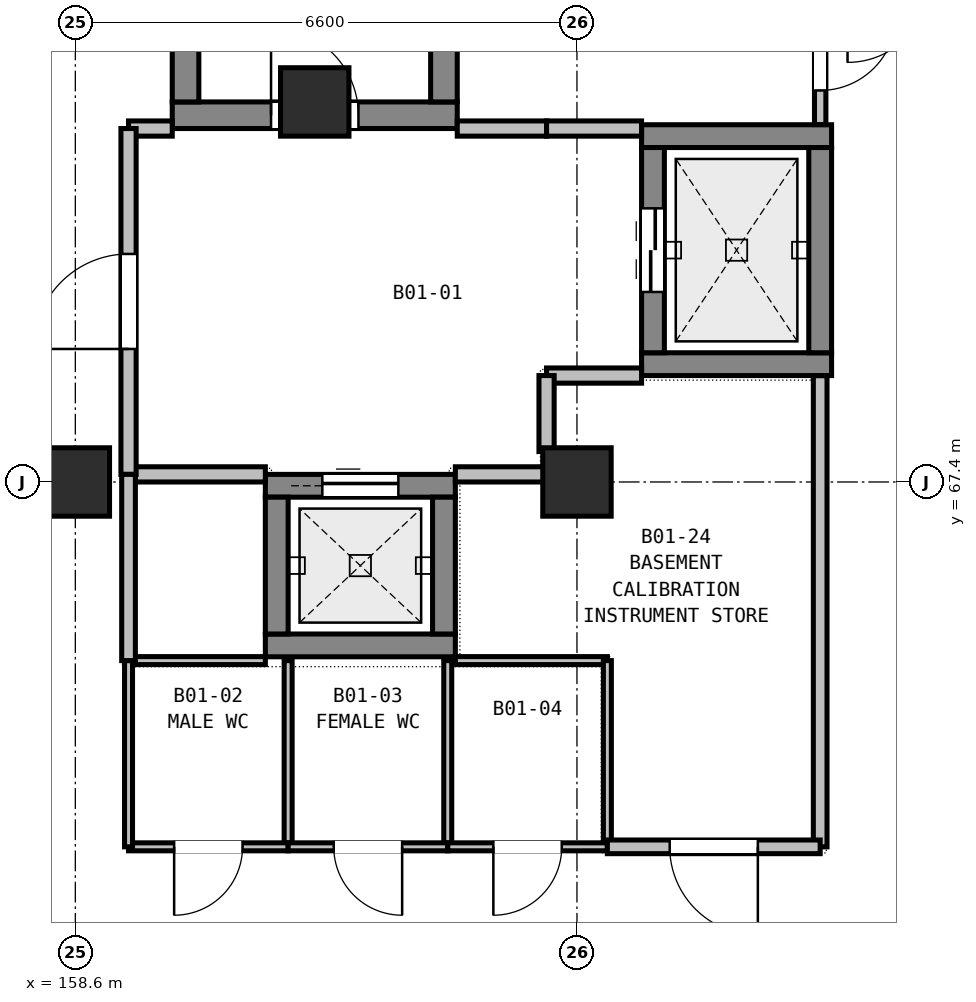
"""IFC4 building model, lengths in metres.
Left out: names, types, materials, properties, quantities, classifications, styles, units other than length and angle.
Written with IfcOpenShell. Run it as: python <this file> out.ifc"""

import sys

from ifc_helpers import new_model, si_unit, direction, frame, frame_2d, origin, origin_2d, place, context, subcontext, project, spatial, rectangle, extrude, element, fill, save


model = new_model("IFC4")
c1 = context("Model", 3, precision=1e-05, world=origin(), true_north=direction((0.0, 1.0)))
c2 = subcontext(c1, "Body", "Model", "MODEL_VIEW")
j1 = project(units=[si_unit("LENGTHUNIT", "METRE"), si_unit("PLANEANGLEUNIT", "RADIAN")], contexts=[c1])
p1 = place(None, origin())
s1 = spatial("IfcSite", under=j1, at=p1, CompositionType="ELEMENT")
p2 = place(p1, origin())
s2 = spatial("IfcBuilding", under=s1, at=p2, CompositionType="ELEMENT")
p3 = place(p2, frame((0.0, 0.0, -4.5)))
s3 = spatial("IfcBuildingStorey", under=s2, at=p3, CompositionType="ELEMENT", Elevation=-4.5)
for number, where, z_axis, x_axis in (
    (1, (158.6, 67.4, 0.0), (0.0, 0.0, 1.0), (1.0, 0.0, 0.0)),
    (2, (165.2, 67.4, 0.0), (0.0, 0.0, 1.0), (1.0, 0.0, 0.0)),
):
    element("IfcColumn", number, at=place(p3, frame(where, z_axis=z_axis, x_axis=x_axis)), inside=s3, PredefinedType="COLUMN", context=c2, shape_type="SweptSolid", body=[
        extrude(rectangle(XDim=0.8, YDim=0.8, at=origin_2d()), origin(), (0.0, 0.0, 1.0), 4.5),
    ])
p4 = place(p3, frame((159.875, 72.225, 0.0), z_axis=(0.0, 0.0, 1.0), x_axis=(1.0, 0.0, 0.0)))
e3 = element("IfcWall", 3, at=p4, inside=s3, PredefinedType="SHEAR", context=c2, shape_type="SweptSolid", body=[
    extrude(rectangle(XDim=3.75, YDim=0.35, at=frame_2d((1.875, 0.0))), origin(), (0.0, 0.0, 1.0), 4.5),
])
p5 = place(p4, frame((1.3, 0.0, 0.0)))
e4 = element("IfcOpeningElement", 4, at=p5, cuts=e3, PredefinedType="OPENING", context=c2, shape_type="SweptSolid", body=[
    extrude(rectangle(XDim=1.15, YDim=2.15, at=frame_2d((0.575, 1.075))), frame((0.0, 0.185, 0.0), z_axis=(0.0, -1.0, 0.0), x_axis=(1.0, 0.0, 0.0)), (0.0, 0.0, 1.0), 0.37),
])
for number, where, z_axis, x_axis in (
    (5, (160.05, 72.4, 0.0), (0.0, 0.0, 1.0), (0.0, 1.0, 0.0)),
    (6, (163.45, 72.4, 0.0), (0.0, 0.0, 1.0), (0.0, 1.0, 0.0)),
):
    element("IfcWall", number, at=place(p3, frame(where, z_axis=z_axis, x_axis=x_axis)), inside=s3, PredefinedType="SHEAR", context=c2, shape_type="SweptSolid", body=[
        extrude(rectangle(XDim=7.375, YDim=0.35, at=frame_2d((3.688, 0.0))), origin(), (0.0, 0.0, 1.0), 4.5),
    ])
for number, where, z_axis, x_axis in (
    (7, (166.05, 68.95, -0.82), (0.0, 0.0, 1.0), (1.0, 0.0, 0.0)),
    (8, (166.05, 71.95, -0.82), (0.0, 0.0, 1.0), (1.0, 0.0, 0.0)),
):
    element("IfcWall", number, at=place(p3, frame(where, z_axis=z_axis, x_axis=x_axis)), inside=s3, PredefinedType="SHEAR", context=c2, shape_type="SweptSolid", body=[
        extrude(rectangle(XDim=2.5, YDim=0.3, at=frame_2d((1.25, 0.0))), origin(), (0.0, 0.0, 1.0), 5.32),
    ])
p6 = place(p3, frame((166.2, 69.1, -0.82), z_axis=(0.0, 0.0, 1.0), x_axis=(0.0, 1.0, 0.0)))
e9 = element("IfcWall", 9, at=p6, inside=s3, PredefinedType="SHEAR", context=c2, shape_type="SweptSolid", body=[
    extrude(rectangle(XDim=2.7, YDim=0.3, at=frame_2d((1.35, 0.0))), origin(), (0.0, 0.0, 1.0), 5.32),
])
p7 = place(p6, frame((0.8, 0.0, 0.82)))
e10 = element("IfcOpeningElement", 10, at=p7, cuts=e9, PredefinedType="OPENING", context=c2, shape_type="SweptSolid", body=[
    extrude(rectangle(XDim=1.1, YDim=2.1, at=frame_2d((0.55, 1.05))), frame((0.0, 0.16, 0.0), z_axis=(0.0, -1.0, 0.0), x_axis=(1.0, 0.0, 0.0)), (0.0, 0.0, 1.0), 0.32),
])
p8 = place(p3, frame((168.4, 69.1, -0.82), z_axis=(0.0, 0.0, 1.0), x_axis=(0.0, 1.0, 0.0)))
e11 = element("IfcWall", 11, at=p8, inside=s3, PredefinedType="SHEAR", context=c2, shape_type="SweptSolid", body=[
    extrude(rectangle(XDim=2.7, YDim=0.3, at=frame_2d((1.35, 0.0))), origin(), (0.0, 0.0, 1.0), 5.32),
])
p9 = place(p3, frame((161.1, 65.25, -0.82), z_axis=(0.0, 0.0, 1.0), x_axis=(1.0, 0.0, 0.0)))
e12 = element("IfcWall", 12, at=p9, inside=s3, PredefinedType="SHEAR", context=c2, shape_type="SweptSolid", body=[
    extrude(rectangle(XDim=2.5, YDim=0.3, at=frame_2d((1.25, 0.0))), origin(), (0.0, 0.0, 1.0), 5.32),
])
p10 = place(p3, frame((161.1, 67.35, -0.82), z_axis=(0.0, 0.0, 1.0), x_axis=(1.0, 0.0, 0.0)))
e13 = element("IfcWall", 13, at=p10, inside=s3, PredefinedType="SHEAR", context=c2, shape_type="SweptSolid", body=[
    extrude(rectangle(XDim=2.5, YDim=0.3, at=frame_2d((1.25, 0.0))), origin(), (0.0, 0.0, 1.0), 5.32),
])
p11 = place(p10, frame((0.75, 0.0, 0.82)))
e14 = element("IfcOpeningElement", 14, at=p11, cuts=e13, PredefinedType="OPENING", context=c2, shape_type="SweptSolid", body=[
    extrude(rectangle(XDim=1.0, YDim=2.1, at=frame_2d((0.5, 1.05))), frame((0.0, 0.16, 0.0), z_axis=(0.0, -1.0, 0.0), x_axis=(1.0, 0.0, 0.0)), (0.0, 0.0, 1.0), 0.32),
])
for number, where, z_axis, x_axis in (
    (15, (161.25, 65.4, -0.82), (0.0, 0.0, 1.0), (0.0, 1.0, 0.0)),
    (16, (163.45, 65.4, -0.82), (0.0, 0.0, 1.0), (0.0, 1.0, 0.0)),
):
    element("IfcWall", number, at=place(p3, frame(where, z_axis=z_axis, x_axis=x_axis)), inside=s3, PredefinedType="SHEAR", context=c2, shape_type="SweptSolid", body=[
        extrude(rectangle(XDim=1.8, YDim=0.3, at=frame_2d((0.9, 0.0))), origin(), (0.0, 0.0, 1.0), 5.32),
    ])
for number, where, z_axis, x_axis in (
    (17, (158.6, 67.4, -1.2), (0.0, 0.0, 1.0), (1.0, 0.0, 0.0)),
    (18, (161.75, 72.4, -1.2), (0.0, 0.0, 1.0), (1.0, 0.0, 0.0)),
    (19, (165.2, 67.4, -1.2), (0.0, 0.0, 1.0), (1.0, 0.0, 0.0)),
):
    element("IfcColumn", number, at=place(p3, frame(where, z_axis=z_axis, x_axis=x_axis)), inside=s3, PredefinedType="COLUMN", context=c2, shape_type="SweptSolid", body=[
        extrude(rectangle(XDim=0.9, YDim=0.9, at=origin_2d()), origin(), (0.0, 0.0, 1.0), 1.2),
    ])
p12 = place(p3, frame((159.3, 72.05, 0.0), z_axis=(0.0, 0.0, 1.0), x_axis=(1.0, 0.0, 0.0)))
e20 = element("IfcWall", 20, at=p12, inside=s3, PredefinedType="PARTITIONING", context=c2, shape_type="SweptSolid", body=[
    extrude(rectangle(XDim=0.575, YDim=0.2, at=frame_2d((0.288, 0.0))), origin(), (0.0, 0.0, 1.0), 4.175),
])
p13 = place(p3, frame((163.625, 72.05, 0.0), z_axis=(0.0, 0.0, 1.0), x_axis=(1.0, 0.0, 0.0)))
e21 = element("IfcWall", 21, at=p13, inside=s3, PredefinedType="PARTITIONING", context=c2, shape_type="SweptSolid", body=[
    extrude(rectangle(XDim=1.175, YDim=0.2, at=frame_2d((0.587, 0.0))), origin(), (0.0, 0.0, 1.0), 4.175),
])
for number, where, z_axis, x_axis in (
    (22, (164.8, 72.05, 0.0), (0.0, 0.0, 1.0), (1.0, 0.0, 0.0)),
    (23, (166.05, 68.8, 0.0), (0.0, 0.0, 1.0), (-1.0, 0.0, 0.0)),
):
    element("IfcWall", number, at=place(p3, frame(where, z_axis=z_axis, x_axis=x_axis)), inside=s3, PredefinedType="PARTITIONING", context=c2, shape_type="SweptSolid", body=[
        extrude(rectangle(XDim=1.25, YDim=0.2, at=frame_2d((0.625, 0.0))), origin(), (0.0, 0.0, 1.0), 3.635),
    ])
p14 = place(p3, frame((164.8, 68.8, 0.0), z_axis=(0.0, 0.0, 1.0), x_axis=(0.0, -1.0, 0.0)))
e24 = element("IfcWall", 24, at=p14, inside=s3, PredefinedType="PARTITIONING", context=c2, shape_type="SweptSolid", body=[
    extrude(rectangle(XDim=1.0, YDim=0.2, at=frame_2d((0.5, 0.0))), origin(), (0.0, 0.0, 1.0), 4.175),
])
p15 = place(p3, frame((164.8, 67.5, 0.0), z_axis=(0.0, 0.0, 1.0), x_axis=(-1.0, 0.0, 0.0)))
e25 = element("IfcWall", 25, at=p15, inside=s3, PredefinedType="PARTITIONING", context=c2, shape_type="SweptSolid", body=[
    extrude(rectangle(XDim=1.2, YDim=0.2, at=frame_2d((0.6, 0.0))), origin(), (0.0, 0.0, 1.0), 3.835),
])
p16 = place(p3, frame((161.1, 67.5, 0.0), z_axis=(0.0, 0.0, 1.0), x_axis=(-1.0, 0.0, 0.0)))
e26 = element("IfcWall", 26, at=p16, inside=s3, PredefinedType="PARTITIONING", context=c2, shape_type="SweptSolid", body=[
    extrude(rectangle(XDim=1.8, YDim=0.2, at=frame_2d((0.9, 0.0))), origin(), (0.0, 0.0, 1.0), 3.835),
])
p17 = place(p3, frame((159.3, 67.5, 0.0), z_axis=(0.0, 0.0, 1.0), x_axis=(0.0, 1.0, 0.0)))
e27 = element("IfcWall", 27, at=p17, inside=s3, PredefinedType="PARTITIONING", context=c2, shape_type="SweptSolid", body=[
    extrude(rectangle(XDim=4.55, YDim=0.2, at=frame_2d((2.275, 0.0))), origin(), (0.0, 0.0, 1.0), 3.835),
])
p18 = place(p17, frame((1.65, 0.0, 0.0)))
e28 = element("IfcOpeningElement", 28, at=p18, cuts=e27, PredefinedType="OPENING", context=c2, shape_type="SweptSolid", body=[
    extrude(rectangle(XDim=1.25, YDim=2.15, at=frame_2d((0.625, 1.075))), frame((0.0, 0.11, 0.0), z_axis=(0.0, -1.0, 0.0), x_axis=(1.0, 0.0, 0.0)), (0.0, 0.0, 1.0), 0.22),
])
p19 = place(p3, frame((168.4, 74.0, 0.0), z_axis=(0.0, 0.0, 1.0), x_axis=(0.0, -1.0, 0.0)))
e29 = element("IfcWall", 29, at=p19, inside=s3, PredefinedType="PARTITIONING", context=c2, shape_type="SweptSolid", body=[
    extrude(rectangle(XDim=1.898, YDim=0.15, at=frame_2d((0.949, 0.0))), origin(), (0.0, 0.0, 1.0), 4.035),
])
p20 = place(p19, frame((0.449, 0.0, 0.0)))
e30 = element("IfcOpeningElement", 30, at=p20, cuts=e29, PredefinedType="OPENING", context=c2, shape_type="SweptSolid", body=[
    extrude(rectangle(XDim=1.0, YDim=2.1, at=frame_2d((0.5, 1.05))), frame((0.0, 0.085, 0.0), z_axis=(0.0, -1.0, 0.0), x_axis=(1.0, 0.0, 0.0)), (0.0, 0.0, 1.0), 0.17),
])
p21 = place(p3, frame((159.3, 65.05, 0.0), z_axis=(0.0, 0.0, 1.0), x_axis=(1.0, 0.0, 0.0)))
e31 = element("IfcWall", 31, at=p21, inside=s3, PredefinedType="PARTITIONING", context=c2, shape_type="SweptSolid", body=[
    extrude(rectangle(XDim=1.8, YDim=0.105, at=frame_2d((0.9, 0.0))), origin(), (0.0, 0.0, 1.0), 4.175),
])
p22 = place(p3, frame((161.4, 65.05, 0.0), z_axis=(0.0, 0.0, 1.0), x_axis=(0.0, -1.0, 0.0)))
e32 = element("IfcWall", 32, at=p22, inside=s3, PredefinedType="PARTITIONING", context=c2, shape_type="SweptSolid", body=[
    extrude(rectangle(XDim=2.45, YDim=0.105, at=frame_2d((1.225, 0.0))), origin(), (0.0, 0.0, 1.0), 4.175),
])
p23 = place(p3, frame((161.4, 62.6, 0.0), z_axis=(0.0, 0.0, 1.0), x_axis=(-1.0, 0.0, 0.0)))
e33 = element("IfcWall", 33, at=p23, inside=s3, PredefinedType="PARTITIONING", context=c2, shape_type="SweptSolid", body=[
    extrude(rectangle(XDim=2.1, YDim=0.105, at=frame_2d((1.05, 0.0))), origin(), (0.0, 0.0, 1.0), 4.175),
])
p24 = place(p23, frame((0.6, 0.0, 0.0)))
e34 = element("IfcOpeningElement", 34, at=p24, cuts=e33, PredefinedType="OPENING", context=c2, shape_type="SweptSolid", body=[
    extrude(rectangle(XDim=0.9, YDim=2.02, at=frame_2d((0.45, 1.01))), frame((0.0, 0.062, 0.0), z_axis=(0.0, -1.0, 0.0), x_axis=(1.0, 0.0, 0.0)), (0.0, 0.0, 1.0), 0.125),
])
for number, where, z_axis, x_axis in (
    (35, (159.3, 62.6, 0.0), (0.0, 0.0, 1.0), (0.0, 1.0, 0.0)),
    (36, (163.5, 65.05, 0.0), (0.0, 0.0, 1.0), (0.0, -1.0, 0.0)),
):
    element("IfcWall", number, at=place(p3, frame(where, z_axis=z_axis, x_axis=x_axis)), inside=s3, PredefinedType="PARTITIONING", context=c2, shape_type="SweptSolid", body=[
        extrude(rectangle(XDim=2.45, YDim=0.105, at=frame_2d((1.225, 0.0))), origin(), (0.0, 0.0, 1.0), 4.175),
    ])
p25 = place(p3, frame((163.5, 62.6, 0.0), z_axis=(0.0, 0.0, 1.0), x_axis=(-1.0, 0.0, 0.0)))
e37 = element("IfcWall", 37, at=p25, inside=s3, PredefinedType="PARTITIONING", context=c2, shape_type="SweptSolid", body=[
    extrude(rectangle(XDim=2.1, YDim=0.105, at=frame_2d((1.05, 0.0))), origin(), (0.0, 0.0, 1.0), 4.175),
])
p26 = place(p25, frame((0.6, 0.0, 0.0)))
e38 = element("IfcOpeningElement", 38, at=p26, cuts=e37, PredefinedType="OPENING", context=c2, shape_type="SweptSolid", body=[
    extrude(rectangle(XDim=0.9, YDim=2.02, at=frame_2d((0.45, 1.01))), frame((0.0, 0.062, 0.0), z_axis=(0.0, -1.0, 0.0), x_axis=(1.0, 0.0, 0.0)), (0.0, 0.0, 1.0), 0.125),
])
p27 = place(p3, frame((163.6, 65.05, 0.0), z_axis=(0.0, 0.0, 1.0), x_axis=(1.0, 0.0, 0.0)))
e39 = element("IfcWall", 39, at=p27, inside=s3, PredefinedType="PARTITIONING", context=c2, shape_type="SweptSolid", body=[
    extrude(rectangle(XDim=2.0, YDim=0.105, at=frame_2d((1.0, 0.0))), origin(), (0.0, 0.0, 1.0), 3.635),
])
p28 = place(p3, frame((165.6, 65.05, 0.0), z_axis=(0.0, 0.0, 1.0), x_axis=(0.0, -1.0, 0.0)))
e40 = element("IfcWall", 40, at=p28, inside=s3, PredefinedType="PARTITIONING", context=c2, shape_type="SweptSolid", body=[
    extrude(rectangle(XDim=2.45, YDim=0.105, at=frame_2d((1.225, 0.0))), origin(), (0.0, 0.0, 1.0), 4.175),
])
p29 = place(p3, frame((165.6, 62.6, 0.0), z_axis=(0.0, 0.0, 1.0), x_axis=(-1.0, 0.0, 0.0)))
e41 = element("IfcWall", 41, at=p29, inside=s3, PredefinedType="PARTITIONING", context=c2, shape_type="SweptSolid", body=[
    extrude(rectangle(XDim=2.1, YDim=0.105, at=frame_2d((1.05, 0.0))), origin(), (0.0, 0.0, 1.0), 3.635),
])
p30 = place(p29, frame((0.6, 0.0, 0.0)))
e42 = element("IfcOpeningElement", 42, at=p30, cuts=e41, PredefinedType="OPENING", context=c2, shape_type="SweptSolid", body=[
    extrude(rectangle(XDim=0.9, YDim=2.02, at=frame_2d((0.45, 1.01))), frame((0.0, 0.062, 0.0), z_axis=(0.0, -1.0, 0.0), x_axis=(1.0, 0.0, 0.0)), (0.0, 0.0, 1.0), 0.125),
])
p31 = place(p3, frame((168.4, 68.798, 0.0), z_axis=(0.0, 0.0, 1.0), x_axis=(0.0, -1.0, 0.0)))
e43 = element("IfcWall", 43, at=p31, inside=s3, PredefinedType="PARTITIONING", context=c2, shape_type="SweptSolid", body=[
    extrude(rectangle(XDim=6.198, YDim=0.18, at=frame_2d((3.099, 0.0))), origin(), (0.0, 0.0, 1.0), 3.835),
])
p32 = place(p3, frame((168.4, 62.6, 0.0), z_axis=(0.0, 0.0, 1.0), x_axis=(-1.0, 0.0, 0.0)))
e44 = element("IfcWall", 44, at=p32, inside=s3, PredefinedType="PARTITIONING", context=c2, shape_type="SweptSolid", body=[
    extrude(rectangle(XDim=2.8, YDim=0.18, at=frame_2d((1.4, 0.0))), origin(), (0.0, 0.0, 1.0), 4.035),
])
p33 = place(p32, frame((0.82, 0.0, 0.0)))
e45 = element("IfcOpeningElement", 45, at=p33, cuts=e44, PredefinedType="OPENING", context=c2, shape_type="SweptSolid", body=[
    extrude(rectangle(XDim=1.16, YDim=2.14, at=frame_2d((0.58, 1.07))), frame((0.0, 0.1, 0.0), z_axis=(0.0, -1.0, 0.0), x_axis=(1.0, 0.0, 0.0)), (0.0, 0.0, 1.0), 0.2),
])
p34 = place(p3, frame((159.3, 65.05, 0.0), z_axis=(0.0, 0.0, 1.0), x_axis=(0.0, 1.0, 0.0)))
e46 = element("IfcWall", 46, at=p34, inside=s3, PredefinedType="PARTITIONING", context=c2, shape_type="SweptSolid", body=[
    extrude(rectangle(XDim=2.45, YDim=0.18, at=frame_2d((1.225, 0.0))), origin(), (0.0, 0.0, 1.0), 3.835),
])
p35 = place(p5, origin())
e47 = element("IfcDoor", 47, at=p35, inside=s3, OperationType="SINGLE_SWING_LEFT", PredefinedType="DOOR", context=c2, shape_type="SweptSolid", body=[
    extrude(rectangle(XDim=1.15, YDim=2.15, at=frame_2d((0.575, 1.075))), frame((0.0, 0.025, 0.0), z_axis=(0.0, -1.0, 0.0), x_axis=(1.0, 0.0, 0.0)), (0.0, 0.0, 1.0), 0.05),
])
fill(e4, e47)
p36 = place(p7, origin())
e48 = element("IfcDoor", 48, at=p36, inside=s3, OperationType="DOUBLE_DOOR_SLIDING", PredefinedType="DOOR", context=c2, shape_type="SweptSolid", body=[
    extrude(rectangle(XDim=1.1, YDim=2.1, at=frame_2d((0.55, 1.05))), frame((0.0, 0.025, 0.0), z_axis=(0.0, -1.0, 0.0), x_axis=(1.0, 0.0, 0.0)), (0.0, 0.0, 1.0), 0.05),
])
fill(e10, e48)
p37 = place(p11, origin())
e49 = element("IfcDoor", 49, at=p37, inside=s3, OperationType="SLIDING_TO_LEFT", PredefinedType="DOOR", context=c2, shape_type="SweptSolid", body=[
    extrude(rectangle(XDim=1.0, YDim=2.1, at=frame_2d((0.5, 1.05))), frame((0.0, 0.025, 0.0), z_axis=(0.0, -1.0, 0.0), x_axis=(1.0, 0.0, 0.0)), (0.0, 0.0, 1.0), 0.05),
])
fill(e14, e49)
p38 = place(p18, origin())
e50 = element("IfcDoor", 50, at=p38, inside=s3, OperationType="SINGLE_SWING_LEFT", PredefinedType="DOOR", context=c2, shape_type="SweptSolid", body=[
    extrude(rectangle(XDim=1.25, YDim=2.15, at=frame_2d((0.625, 1.075))), frame((0.0, 0.025, 0.0), z_axis=(0.0, -1.0, 0.0), x_axis=(1.0, 0.0, 0.0)), (0.0, 0.0, 1.0), 0.05),
])
fill(e28, e50)
p39 = place(p20, origin())
e51 = element("IfcDoor", 51, at=p39, inside=s3, OperationType="SINGLE_SWING_LEFT", PredefinedType="DOOR", context=c2, shape_type="SweptSolid", body=[
    extrude(rectangle(XDim=1.0, YDim=2.1, at=frame_2d((0.5, 1.05))), frame((0.0, 0.025, 0.0), z_axis=(0.0, -1.0, 0.0), x_axis=(1.0, 0.0, 0.0)), (0.0, 0.0, 1.0), 0.05),
])
fill(e30, e51)
p40 = place(p24, origin())
e52 = element("IfcDoor", 52, at=p40, inside=s3, OperationType="SINGLE_SWING_RIGHT", PredefinedType="DOOR", context=c2, shape_type="SweptSolid", body=[
    extrude(rectangle(XDim=0.9, YDim=2.02, at=frame_2d((0.45, 1.01))), frame((0.0, 0.025, 0.0), z_axis=(0.0, -1.0, 0.0), x_axis=(1.0, 0.0, 0.0)), (0.0, 0.0, 1.0), 0.05),
])
fill(e34, e52)
p41 = place(p26, origin())
e53 = element("IfcDoor", 53, at=p41, inside=s3, OperationType="SINGLE_SWING_LEFT", PredefinedType="DOOR", context=c2, shape_type="SweptSolid", body=[
    extrude(rectangle(XDim=0.9, YDim=2.02, at=frame_2d((0.45, 1.01))), frame((0.0, 0.025, 0.0), z_axis=(0.0, -1.0, 0.0), x_axis=(1.0, 0.0, 0.0)), (0.0, 0.0, 1.0), 0.05),
])
fill(e38, e53)
p42 = place(p30, origin())
e54 = element("IfcDoor", 54, at=p42, inside=s3, OperationType="SINGLE_SWING_RIGHT", PredefinedType="DOOR", context=c2, shape_type="SweptSolid", body=[
    extrude(rectangle(XDim=0.9, YDim=2.02, at=frame_2d((0.45, 1.01))), frame((0.0, 0.025, 0.0), z_axis=(0.0, -1.0, 0.0), x_axis=(1.0, 0.0, 0.0)), (0.0, 0.0, 1.0), 0.05),
])
fill(e42, e54)
p43 = place(p33, origin())
e55 = element("IfcDoor", 55, at=p43, inside=s3, OperationType="SINGLE_SWING_LEFT", PredefinedType="DOOR", context=c2, shape_type="SweptSolid", body=[
    extrude(rectangle(XDim=1.16, YDim=2.14, at=frame_2d((0.58, 1.07))), frame((0.0, 0.025, 0.0), z_axis=(0.0, -1.0, 0.0), x_axis=(1.0, 0.0, 0.0)), (0.0, 0.0, 1.0), 0.05),
])
fill(e45, e55)
save(model, sys.argv[1])
